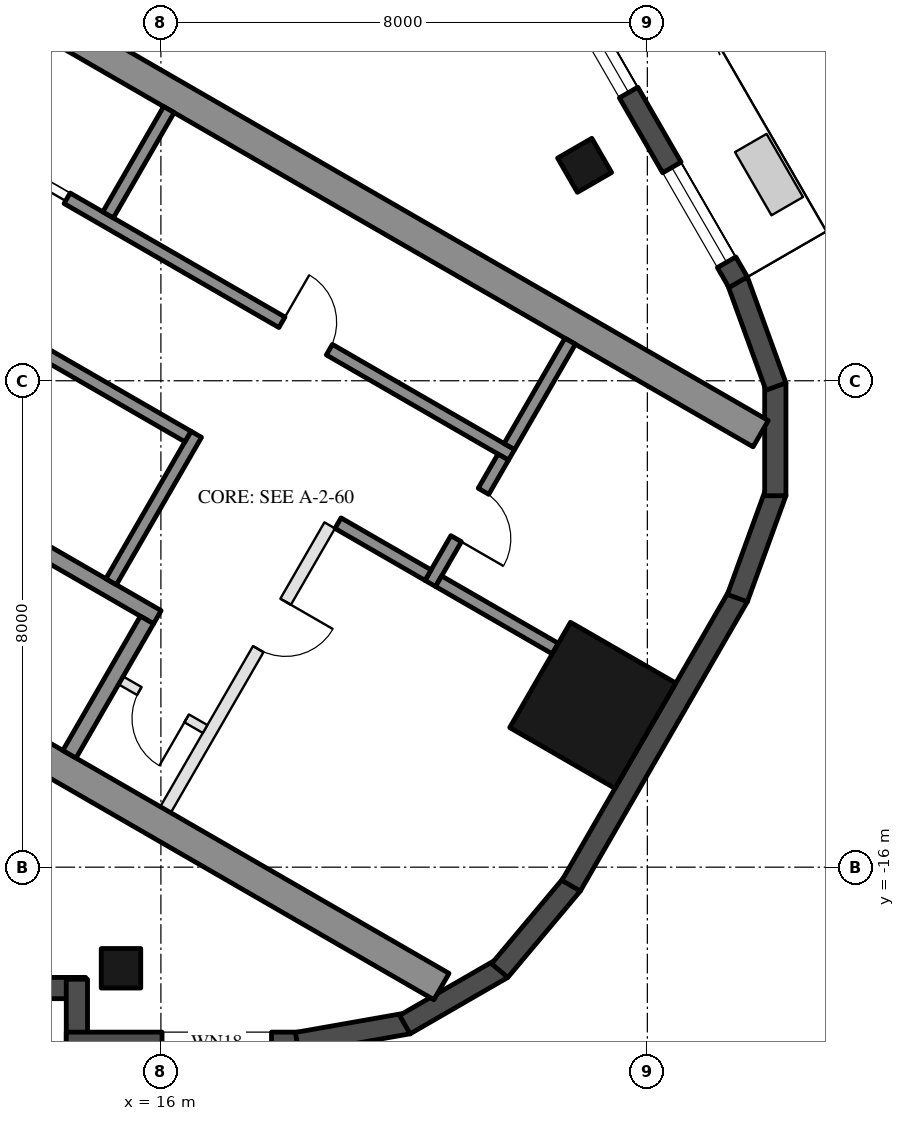
"""IFC4 building model, lengths in metres.
Left out: names, types, materials, properties, quantities, classifications, styles, units other than length and angle.
Written with IfcOpenShell. Run it as: python <this file> out.ifc"""

import sys

from ifc_helpers import new_model, si_unit, direction, frame, frame_2d, origin, origin_2d, place, context, subcontext, project, spatial, rectangle, hollow_rectangle, extrude, boolean, halfspace, element, fill, save


model = new_model("IFC4")
c1 = context("Model", 3, precision=1e-05, world=origin(), true_north=direction((0.0, 1.0)))
c2 = subcontext(c1, "Body", "Model", "MODEL_VIEW")
j1 = project(units=[si_unit("LENGTHUNIT", "METRE"), si_unit("PLANEANGLEUNIT", "RADIAN")], contexts=[c1])
p1 = place(None, origin())
s1 = spatial("IfcSite", under=j1, at=p1, CompositionType="ELEMENT")
p2 = place(p1, origin())
s2 = spatial("IfcBuilding", under=s1, at=p2, CompositionType="ELEMENT")
p3 = place(p2, frame((0.0, 0.0, 261.5)))
s3 = spatial("IfcBuildingStorey", under=s2, at=p3, CompositionType="ELEMENT", Elevation=261.5)
for number, where, z_axis, x_axis in (
    (1, (15.344, -17.663, 0.0), (0.0, 0.0, 1.0), (-1.0, 0.0, 0.0)),
    (2, (22.968, -4.457, 0.0), (0.0, 0.0, 1.0), (-0.5, 0.866, 0.0)),
):
    element("IfcColumn", number, at=place(p3, frame(where, z_axis=z_axis, x_axis=x_axis)), inside=s3, PredefinedType="COLUMN", context=c2, shape_type="SweptSolid", body=[
        boolean("DIFFERENCE", extrude(hollow_rectangle(XDim=0.65, YDim=0.65, WallThickness=0.03, at=origin_2d()), origin(), (0.0, 0.0, 1.0), 3.7), halfspace(frame((0.0, 0.0, 3.653), z_axis=(0.0, 0.0, 1.0), x_axis=(1.0, 0.0, 0.0)), False)),
    ])
p4 = place(p3, frame((23.102, -13.338, 0.0), z_axis=(0.0, 0.0, 1.0), x_axis=(0.5, 0.866025403784, 0.0)))
e3 = element("IfcColumn", 3, at=p4, inside=s3, PredefinedType="COLUMN", context=c2, shape_type="SweptSolid", body=[
    boolean("DIFFERENCE", extrude(hollow_rectangle(XDim=2.0, YDim=2.0, WallThickness=0.05, at=origin_2d()), origin(), (0.0, 0.0, 1.0), 3.7), halfspace(frame((0.0, 0.0, 3.587), z_axis=(0.0, 0.0, 1.0), x_axis=(1.0, 0.0, 0.0)), False)),
])
p5 = place(p3, frame((8.252, -17.988, 0.0), z_axis=(0.0, 0.0, 1.0), x_axis=(1.0, 0.0, 0.0)))
e4 = element("IfcWall", 4, at=p5, inside=s3, PredefinedType="SOLIDWALL", context=c2, shape_type="SweptSolid", body=[
    extrude(rectangle(XDim=6.512, YDim=0.35, at=frame_2d((3.256, 0.0))), origin(), (0.0, 0.0, 1.0), 3.55),
])
p6 = place(p5, frame((0.77, 0.0, 0.0)))
e5 = element("IfcOpeningElement", 5, at=p6, cuts=e4, PredefinedType="OPENING", context=c2, shape_type="SweptSolid", body=[
    extrude(rectangle(XDim=2.4, YDim=2.4, at=frame_2d((1.2, 1.2))), frame((0.0, 0.185, 0.0), z_axis=(0.0, -1.0, 0.0), x_axis=(1.0, 0.0, 0.0)), (0.0, 0.0, 1.0), 0.37),
])
p7 = place(p5, frame((3.47, 0.0, 0.3)))
e6 = element("IfcOpeningElement", 6, at=p7, cuts=e4, PredefinedType="OPENING", context=c2, shape_type="SweptSolid", body=[
    extrude(rectangle(XDim=2.2, YDim=2.65, at=frame_2d((1.1, 1.325))), frame((0.0, 0.185, 0.0), z_axis=(0.0, -1.0, 0.0), x_axis=(1.0, 0.0, 0.0)), (0.0, 0.0, 1.0), 0.37),
])
p8 = place(p3, frame((14.618, -17.843, 0.0), z_axis=(0.0, 0.0, 1.0), x_axis=(0.0, -1.0, 0.0)))
e7 = element("IfcWall", 7, at=p8, inside=s3, PredefinedType="SOLIDWALL", context=c2, shape_type="SweptSolid", body=[
    extrude(rectangle(XDim=1.22, YDim=0.35, at=frame_2d((0.61, 0.0))), origin(), (0.0, 0.0, 1.0), 3.55),
])
p9 = place(p3, frame((14.444, -18.888, 0.0), z_axis=(0.0, 0.0, 1.0), x_axis=(1.0, 0.0, 0.0)))
e8 = element("IfcWall", 8, at=p9, inside=s3, PredefinedType="SOLIDWALL", context=c2, shape_type="SweptSolid", body=[
    extrude(rectangle(XDim=3.829, YDim=0.35, at=frame_2d((1.914, 0.0))), origin(), (0.0, 0.0, 1.0), 3.55),
])
p10 = place(p9, frame((1.575, 0.0, 0.3)))
e9 = element("IfcOpeningElement", 9, at=p10, cuts=e8, PredefinedType="OPENING", context=c2, shape_type="SweptSolid", body=[
    extrude(rectangle(XDim=1.8, YDim=2.65, at=frame_2d((0.9, 1.325))), frame((0.0, 0.185, 0.0), z_axis=(0.0, -1.0, 0.0), x_axis=(1.0, 0.0, 0.0)), (0.0, 0.0, 1.0), 0.37),
])
p11 = place(p3, frame((18.242, -18.891, 0.0), z_axis=(0.0, 0.0, 1.0), x_axis=(0.984791508075, 0.173740282098, 0.0)))
e10 = element("IfcWall", 10, at=p11, inside=s3, PredefinedType="SOLIDWALL", context=c2, shape_type="SweptSolid", body=[
    extrude(rectangle(XDim=1.855, YDim=0.35, at=frame_2d((0.927, 0.0))), origin(), (0.0, 0.0, 1.0), 3.55),
])
for number, where, z_axis, x_axis in (
    (11, (20.011, -18.589, 0.0), (0.0, 0.0, 1.0), (0.866, 0.5, 0.0)),
    (12, (21.572, -17.701, 0.0), (0.0, 0.0, 1.0), (0.643, 0.766, 0.0)),
):
    element("IfcWall", number, at=place(p3, frame(where, z_axis=z_axis, x_axis=x_axis)), inside=s3, PredefinedType="SOLIDWALL", context=c2, shape_type="SweptSolid", body=[
        extrude(rectangle(XDim=1.855, YDim=0.35, at=frame_2d((0.927, 0.0))), origin(), (0.0, 0.0, 1.0), 3.55),
    ])
p12 = place(p3, frame((22.746, -16.305, 0.0), z_axis=(0.0, 0.0, 1.0), x_axis=(0.500028854569, 0.86600874395, 0.0)))
e13 = element("IfcWall", 13, at=p12, inside=s3, PredefinedType="SOLIDWALL", context=c2, shape_type="SweptSolid", body=[
    extrude(rectangle(XDim=5.495, YDim=0.35, at=frame_2d((2.748, 0.0))), origin(), (0.0, 0.0, 1.0), 3.55),
])
p13 = place(p3, frame((25.481, -11.574, 0.0), z_axis=(0.0, 0.0, 1.0), x_axis=(0.341890986265, 0.93973962006, 0.0)))
e14 = element("IfcWall", 14, at=p13, inside=s3, PredefinedType="SOLIDWALL", context=c2, shape_type="SweptSolid", body=[
    extrude(rectangle(XDim=1.855, YDim=0.35, at=frame_2d((0.928, 0.0))), origin(), (0.0, 0.0, 1.0), 3.55),
])
for number, where, z_axis, x_axis in (
    (15, (26.104, -9.891, 0.0), (0.0, 0.0, 1.0), (0.0, 1.0, 0.0)),
    (16, (26.115, -8.096, 0.0), (0.0, 0.0, 1.0), (-0.342, 0.94, 0.0)),
):
    element("IfcWall", number, at=place(p3, frame(where, z_axis=z_axis, x_axis=x_axis)), inside=s3, PredefinedType="SOLIDWALL", context=c2, shape_type="SweptSolid", body=[
        extrude(rectangle(XDim=1.855, YDim=0.35, at=frame_2d((0.927, 0.0))), origin(), (0.0, 0.0, 1.0), 3.55),
    ])
p14 = place(p3, frame((25.494, -6.38, 0.0), z_axis=(0.0, 0.0, 1.0), x_axis=(-0.499999932627, 0.866025442683, 0.0)))
e17 = element("IfcWall", 17, at=p14, inside=s3, PredefinedType="SOLIDWALL", context=c2, shape_type="SweptSolid", body=[
    extrude(rectangle(XDim=11.5, YDim=0.35, at=frame_2d((5.75, 0.0))), origin(), (0.0, 0.0, 1.0), 3.55),
])
p15 = place(p14, frame((0.38, 0.0, 0.3)))
e18 = element("IfcOpeningElement", 18, at=p15, cuts=e17, PredefinedType="OPENING", context=c2, shape_type="SweptSolid", body=[
    extrude(rectangle(XDim=1.8, YDim=2.65, at=frame_2d((0.9, 1.325))), frame((0.0, 0.185, 0.0), z_axis=(0.0, -1.0, 0.0), x_axis=(1.0, 0.0, 0.0)), (0.0, 0.0, 1.0), 0.37),
])
p16 = place(p14, frame((7.525, 0.0, 0.0)))
e19 = element("IfcOpeningElement", 19, at=p16, cuts=e17, PredefinedType="OPENING", context=c2, shape_type="SweptSolid", body=[
    extrude(rectangle(XDim=2.4, YDim=2.4, at=frame_2d((1.2, 1.2))), frame((0.0, 0.185, 0.0), z_axis=(0.0, -1.0, 0.0), x_axis=(1.0, 0.0, 0.0)), (0.0, 0.0, 1.0), 0.37),
])
p17 = place(p14, frame((3.604, 0.0, 0.3)))
e20 = element("IfcOpeningElement", 20, at=p17, cuts=e17, PredefinedType="OPENING", context=c2, shape_type="SweptSolid", body=[
    extrude(rectangle(XDim=1.6, YDim=2.65, at=frame_2d((0.8, 1.325))), frame((0.0, 0.185, 0.0), z_axis=(0.0, -1.0, 0.0), x_axis=(1.0, 0.0, 0.0)), (0.0, 0.0, 1.0), 0.37),
])
p18 = place(p14, frame((5.503, 0.0, 0.3)))
e21 = element("IfcOpeningElement", 21, at=p18, cuts=e17, PredefinedType="OPENING", context=c2, shape_type="SweptSolid", body=[
    extrude(rectangle(XDim=1.6, YDim=2.65, at=frame_2d((0.8, 1.325))), frame((0.0, 0.185, 0.0), z_axis=(0.0, -1.0, 0.0), x_axis=(1.0, 0.0, 0.0)), (0.0, 0.0, 1.0), 0.37),
])
for number, where, z_axis, x_axis in (
    (22, (8.547, -10.997, 0.0), (0.0, 0.0, 1.0), (0.866, -0.5, 0.0)),
    (23, (13.797, -1.903, 0.0), (0.0, 0.0, 1.0), (0.866, -0.5, 0.0)),
):
    element("IfcWall", number, at=place(p3, frame(where, z_axis=z_axis, x_axis=x_axis)), inside=s3, PredefinedType="SHEAR", context=c2, shape_type="SweptSolid", body=[
        extrude(rectangle(XDim=13.934, YDim=0.5, at=frame_2d((6.967, 0.0))), origin(), (0.0, 0.0, 1.0), 3.5),
    ])
p19 = place(p3, frame((10.356, -8.664, 0.0), z_axis=(0.0, 0.0, 1.0), x_axis=(0.866028629588, -0.499994412703, 0.0)))
e24 = element("IfcWall", 24, at=p19, inside=s3, PredefinedType="SHEAR", context=c2, shape_type="SweptSolid", body=[
    extrude(rectangle(XDim=6.45, YDim=0.25, at=frame_2d((3.225, 0.0))), origin(), (0.0, 0.0, 1.0), 3.5),
])
p20 = place(p19, frame((0.3, 0.0, 0.0)))
e25 = element("IfcOpeningElement", 25, at=p20, cuts=e24, PredefinedType="OPENING", context=c2, shape_type="SweptSolid", body=[
    extrude(rectangle(XDim=1.0, YDim=2.1, at=frame_2d((0.5, 1.05))), frame((0.0, 0.135, 0.0), z_axis=(0.0, -1.0, 0.0), x_axis=(1.0, 0.0, 0.0)), (0.0, 0.0, 1.0), 0.27),
])
p21 = place(p3, frame((14.496, -14.143, 0.0), z_axis=(0.0, 0.0, 1.0), x_axis=(0.500062241894, 0.865989465428, 0.0)))
e26 = element("IfcWall", 26, at=p21, inside=s3, PredefinedType="SHEAR", context=c2, shape_type="SweptSolid", body=[
    extrude(rectangle(XDim=2.55, YDim=0.25, at=frame_2d((1.275, 0.0))), origin(), (0.0, 0.0, 1.0), 3.5),
])
p22 = place(p3, frame((15.181, -11.305, 0.0), z_axis=(0.0, 0.0, 1.0), x_axis=(0.49994636267, 0.866056369097, 0.0)))
e27 = element("IfcWall", 27, at=p22, inside=s3, PredefinedType="SHEAR", context=c2, shape_type="SweptSolid", body=[
    extrude(rectangle(XDim=2.8, YDim=0.2, at=frame_2d((1.4, 0.0))), origin(), (0.0, 0.0, 1.0), 3.5),
])
p23 = place(p3, frame((14.02, -7.517, 0.0), z_axis=(0.0, 0.0, 1.0), x_axis=(0.866034573852, -0.49998411664, 0.0)))
e28 = element("IfcWall", 28, at=p23, inside=s3, PredefinedType="SHEAR", context=c2, shape_type="SweptSolid", body=[
    extrude(rectangle(XDim=2.8, YDim=0.2, at=frame_2d((1.4, 0.0))), origin(), (0.0, 0.0, 1.0), 3.5),
])
p24 = place(p3, frame((12.968, -4.138, 0.0), z_axis=(0.0, 0.0, 1.0), x_axis=(0.866028328073, -0.49999493495, 0.0)))
e29 = element("IfcWall", 29, at=p24, inside=s3, PredefinedType="SHEAR", context=c2, shape_type="SweptSolid", body=[
    extrude(rectangle(XDim=10.16, YDim=0.2, at=frame_2d((5.08, 0.0))), origin(), (0.0, 0.0, 1.0), 3.5),
])
p25 = place(p24, frame((0.62, 0.0, 0.0)))
e30 = element("IfcOpeningElement", 30, at=p25, cuts=e29, PredefinedType="OPENING", context=c2, shape_type="SweptSolid", body=[
    extrude(rectangle(XDim=1.1, YDim=2.1, at=frame_2d((0.55, 1.05))), frame((0.0, 0.11, 0.0), z_axis=(0.0, -1.0, 0.0), x_axis=(1.0, 0.0, 0.0)), (0.0, 0.0, 1.0), 0.22),
])
p26 = place(p24, frame((5.8, 0.0, 0.0)))
e31 = element("IfcOpeningElement", 31, at=p26, cuts=e29, PredefinedType="OPENING", context=c2, shape_type="SweptSolid", body=[
    extrude(rectangle(XDim=0.9, YDim=2.1, at=frame_2d((0.45, 1.05))), frame((0.0, 0.11, 0.0), z_axis=(0.0, -1.0, 0.0), x_axis=(1.0, 0.0, 0.0)), (0.0, 0.0, 1.0), 0.22),
])
p27 = place(p3, frame((20.43, -11.333, 0.0), z_axis=(0.0, 0.0, 1.0), x_axis=(0.500001309137, 0.866024647952, 0.0)))
e32 = element("IfcWall", 32, at=p27, inside=s3, PredefinedType="SHEAR", context=c2, shape_type="SweptSolid", body=[
    extrude(rectangle(XDim=2.4, YDim=0.2, at=frame_2d((1.2, 0.0))), origin(), (0.0, 0.0, 1.0), 3.5),
])
p28 = place(p27, frame((0.85, 0.0, 0.0)))
e33 = element("IfcOpeningElement", 33, at=p28, cuts=e32, PredefinedType="OPENING", context=c2, shape_type="SweptSolid", body=[
    extrude(rectangle(XDim=0.9, YDim=2.1, at=frame_2d((0.45, 1.05))), frame((0.0, 0.11, 0.0), z_axis=(0.0, -1.0, 0.0), x_axis=(1.0, 0.0, 0.0)), (0.0, 0.0, 1.0), 0.22),
])
p29 = place(p3, frame((18.913, -10.342, 0.0), z_axis=(0.0, 0.0, 1.0), x_axis=(0.866038183914, -0.499977863513, 0.0)))
e34 = element("IfcWall", 34, at=p29, inside=s3, PredefinedType="SHEAR", context=c2, shape_type="SweptSolid", body=[
    extrude(rectangle(XDim=1.71, YDim=0.2, at=frame_2d((0.855, 0.0))), origin(), (0.0, 0.0, 1.0), 3.5),
])
for number, where, z_axis, x_axis in (
    (35, (15.131, -5.272, 0.0), (0.0, 0.0, 1.0), (0.5, 0.866, 0.0)),
    (36, (21.73, -9.082, 0.0), (0.0, 0.0, 1.0), (0.5, 0.866, 0.0)),
):
    element("IfcWall", number, at=place(p3, frame(where, z_axis=z_axis, x_axis=x_axis)), inside=s3, PredefinedType="SHEAR", context=c2, shape_type="SweptSolid", body=[
        extrude(rectangle(XDim=2.0, YDim=0.2, at=frame_2d((1.0, 0.0))), origin(), (0.0, 0.0, 1.0), 3.5),
    ])
p30 = place(p3, frame((20.567, -11.297, 0.0), z_axis=(0.0, 0.0, 1.0), x_axis=(0.866079196458, -0.49990681678, 0.0)))
e37 = element("IfcWall", 37, at=p30, inside=s3, PredefinedType="SHEAR", context=c2, shape_type="SweptSolid", body=[
    extrude(rectangle(XDim=2.216, YDim=0.2, at=frame_2d((1.108, 0.0))), origin(), (0.0, 0.0, 1.0), 3.5),
])
p31 = place(p3, frame((16.076, -15.055, 0.0), z_axis=(0.0, 0.0, 1.0), x_axis=(0.499995103361, 0.866028230842, 0.0)))
e38 = element("IfcWall", 38, at=p31, inside=s3, PredefinedType="PARTITIONING", context=c2, shape_type="SweptSolid", body=[
    extrude(rectangle(XDim=5.4, YDim=0.2, at=frame_2d((2.7, 0.0))), origin(), (0.0, 0.0, 1.0), 3.5),
])
p32 = place(p31, frame((3.05, 0.0, 0.0)))
e39 = element("IfcOpeningElement", 39, at=p32, cuts=e38, PredefinedType="OPENING", context=c2, shape_type="SweptSolid", body=[
    extrude(rectangle(XDim=0.9, YDim=2.1, at=frame_2d((0.45, 1.05))), frame((0.0, 0.11, 0.0), z_axis=(0.0, -1.0, 0.0), x_axis=(1.0, 0.0, 0.0)), (0.0, 0.0, 1.0), 0.22),
])
p33 = place(p3, frame((15.342, -12.928, 0.0), z_axis=(0.0, 0.0, 1.0), x_axis=(0.865989903783, -0.500061482766, 0.0)))
e40 = element("IfcWall", 40, at=p33, inside=s3, PredefinedType="PARTITIONING", context=c2, shape_type="SweptSolid", body=[
    extrude(rectangle(XDim=1.6, YDim=0.15, at=frame_2d((0.8, 0.0))), origin(), (0.0, 0.0, 1.0), 3.5),
])
p34 = place(p33, frame((0.35, 0.0, 0.0)))
e41 = element("IfcOpeningElement", 41, at=p34, cuts=e40, PredefinedType="OPENING", context=c2, shape_type="SweptSolid", body=[
    extrude(rectangle(XDim=0.9, YDim=2.1, at=frame_2d((0.45, 1.05))), frame((0.0, 0.085, 0.0), z_axis=(0.0, -1.0, 0.0), x_axis=(1.0, 0.0, 0.0)), (0.0, 0.0, 1.0), 0.17),
])
p35 = place(p15, origin())
e42 = element("IfcWindow", 42, at=p35, inside=s3, PartitioningType="SINGLE_PANEL", PredefinedType="WINDOW", context=c2, shape_type="SweptSolid", body=[
    extrude(rectangle(XDim=1.8, YDim=2.65, at=frame_2d((0.9, 1.325))), frame((0.0, 0.03, 0.0), z_axis=(0.0, -1.0, 0.0), x_axis=(1.0, 0.0, 0.0)), (0.0, 0.0, 1.0), 0.06),
])
fill(e18, e42)
p36 = place(p17, origin())
e43 = element("IfcWindow", 43, at=p36, inside=s3, PartitioningType="SINGLE_PANEL", PredefinedType="WINDOW", context=c2, shape_type="SweptSolid", body=[
    extrude(rectangle(XDim=1.6, YDim=2.65, at=frame_2d((0.8, 1.325))), frame((0.0, 0.03, 0.0), z_axis=(0.0, -1.0, 0.0), x_axis=(1.0, 0.0, 0.0)), (0.0, 0.0, 1.0), 0.06),
])
fill(e20, e43)
p37 = place(p34, frame((0.9, 0.0, 0.0), z_axis=(0.0, 0.0, 1.0), x_axis=(-1.0, 0.0, 0.0)))
e44 = element("IfcDoor", 44, at=p37, inside=s3, OperationType="SINGLE_SWING_LEFT", PredefinedType="DOOR", context=c2, shape_type="SweptSolid", body=[
    extrude(rectangle(XDim=0.9, YDim=2.1, at=frame_2d((0.45, 1.05))), frame((0.0, 0.025, 0.0), z_axis=(0.0, -1.0, 0.0), x_axis=(1.0, 0.0, 0.0)), (0.0, 0.0, 1.0), 0.05),
])
fill(e41, e44)
p38 = place(p25, origin())
e45 = element("IfcDoor", 45, at=p38, inside=s3, OperationType="DOUBLE_DOOR_SLIDING", PredefinedType="DOOR", context=c2, shape_type="SweptSolid", body=[
    extrude(rectangle(XDim=1.1, YDim=2.1, at=frame_2d((0.55, 1.05))), frame((0.0, 0.025, 0.0), z_axis=(0.0, -1.0, 0.0), x_axis=(1.0, 0.0, 0.0)), (0.0, 0.0, 1.0), 0.05),
])
fill(e30, e45)
p39 = place(p26, origin())
e46 = element("IfcDoor", 46, at=p39, inside=s3, OperationType="SINGLE_SWING_LEFT", PredefinedType="DOOR", context=c2, shape_type="SweptSolid", body=[
    extrude(rectangle(XDim=0.9, YDim=2.1, at=frame_2d((0.45, 1.05))), frame((0.0, 0.025, 0.0), z_axis=(0.0, -1.0, 0.0), x_axis=(1.0, 0.0, 0.0)), (0.0, 0.0, 1.0), 0.05),
])
fill(e31, e46)
p40 = place(p28, frame((0.9, 0.0, 0.0), z_axis=(0.0, 0.0, 1.0), x_axis=(-1.0, 0.0, 0.0)))
e47 = element("IfcDoor", 47, at=p40, inside=s3, OperationType="SINGLE_SWING_RIGHT", PredefinedType="DOOR", context=c2, shape_type="SweptSolid", body=[
    extrude(rectangle(XDim=0.9, YDim=2.1, at=frame_2d((0.45, 1.05))), frame((0.0, 0.025, 0.0), z_axis=(0.0, -1.0, 0.0), x_axis=(1.0, 0.0, 0.0)), (0.0, 0.0, 1.0), 0.05),
])
fill(e33, e47)
p41 = place(p32, frame((0.9, 0.0, 0.0), z_axis=(0.0, 0.0, 1.0), x_axis=(-1.0, 0.0, 0.0)))
e48 = element("IfcDoor", 48, at=p41, inside=s3, OperationType="SINGLE_SWING_LEFT", PredefinedType="DOOR", context=c2, shape_type="SweptSolid", body=[
    extrude(rectangle(XDim=0.9, YDim=2.1, at=frame_2d((0.45, 1.05))), frame((0.0, 0.025, 0.0), z_axis=(0.0, -1.0, 0.0), x_axis=(1.0, 0.0, 0.0)), (0.0, 0.0, 1.0), 0.05),
])
fill(e39, e48)
save(model, sys.argv[1])
